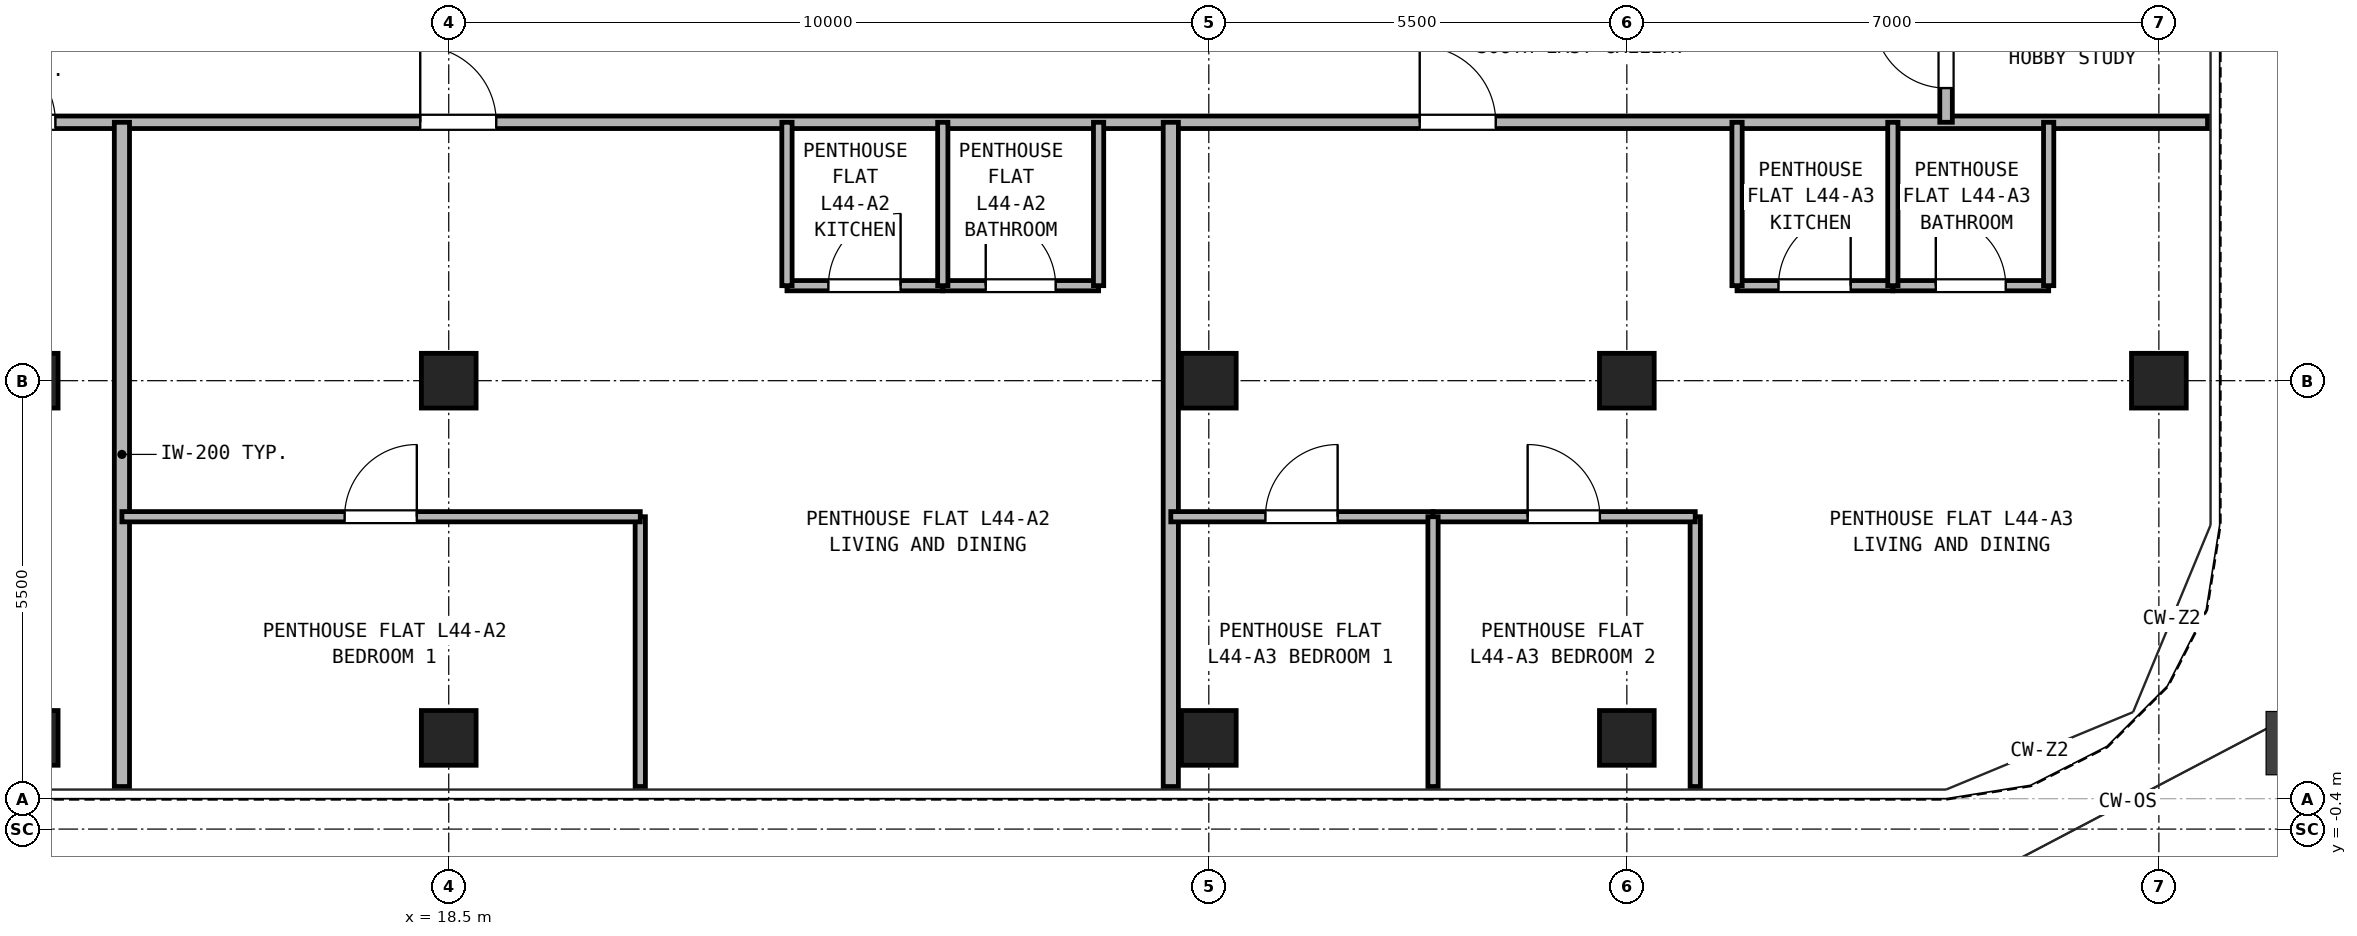
"""IFC4 building model, lengths in metres.
Left out: names, types, materials, properties, quantities, classifications, styles, units other than length and angle.
Written with IfcOpenShell. Run it as: python <this file> out.ifc"""

import sys

from ifc_helpers import new_model, si_unit, direction, frame, frame_2d, origin, origin_2d, place, context, subcontext, project, spatial, rectangle, hollow_rectangle, extrude, source, transform, mapped, element, fill, save


model = new_model("IFC4")
c1 = context("Model", 3, precision=1e-05, world=origin(), true_north=direction((0.0, 1.0)))
c2 = subcontext(c1, "Body", "Model", "MODEL_VIEW")
j1 = project(units=[si_unit("LENGTHUNIT", "METRE"), si_unit("PLANEANGLEUNIT", "RADIAN")], contexts=[c1])
p1 = place(None, origin())
s1 = spatial("IfcSite", under=j1, at=p1, CompositionType="ELEMENT")
p2 = place(p1, origin())
s2 = spatial("IfcBuilding", under=s1, at=p2, CompositionType="ELEMENT")
p3 = place(p2, frame((0.0, 0.0, 159.3)))
s3 = spatial("IfcBuildingStorey", under=s2, at=p3, CompositionType="ELEMENT", Elevation=159.3)
m1 = source(origin(), c2, "Body", "SweptSolid", [
    extrude(hollow_rectangle(XDim=0.72, YDim=0.72, WallThickness=0.04, at=origin_2d()), origin(), (0.0, 0.0, 1.0), 2.95),
])
for number, where, z_axis, x_axis in (
    (1, (13.0, 0.8, 0.0), (0.0, 0.0, 1.0), (1.0, 0.0, 0.0)),
    (2, (18.5, 0.8, 0.0), (0.0, 0.0, 1.0), (1.0, 0.0, 0.0)),
    (3, (28.5, 0.8, 0.0), (0.0, 0.0, 1.0), (1.0, 0.0, 0.0)),
    (4, (34.0, 0.8, 0.0), (0.0, 0.0, 1.0), (1.0, 0.0, 0.0)),
    (5, (41.0, 5.5, 0.0), (0.0, 0.0, 1.0), (1.0, 0.0, 0.0)),
    (6, (13.0, 5.5, 0.0), (0.0, 0.0, 1.0), (1.0, 0.0, 0.0)),
    (7, (18.5, 5.5, 0.0), (0.0, 0.0, 1.0), (1.0, 0.0, 0.0)),
    (8, (28.5, 5.5, 0.0), (0.0, 0.0, 1.0), (1.0, 0.0, 0.0)),
    (9, (34.0, 5.5, 0.0), (0.0, 0.0, 1.0), (1.0, 0.0, 0.0)),
):
    element("IfcColumn", number, at=place(p3, frame(where, z_axis=z_axis, x_axis=x_axis)), inside=s3, PredefinedType="COLUMN", context=c2, shape_type="MappedRepresentation", body=[
        mapped(m1, transform((0.0, 0.0, 0.0), x_axis=(1.0, 0.0, 0.0), y_axis=(0.0, 1.0, 0.0), z_axis=(0.0, 0.0, 1.0), scale=1.0)),
    ])
p4 = place(p3, frame((0.16, 8.9, 0.0), z_axis=(0.0, 0.0, 1.0), x_axis=(1.0, 0.0, 0.0)))
e10 = element("IfcWall", 10, at=p4, inside=s3, PredefinedType="PARTITIONING", context=c2, shape_type="SweptSolid", body=[
    extrude(rectangle(XDim=41.48, YDim=0.165, at=frame_2d((20.74, 0.0))), origin(), (0.0, 0.0, 1.0), 2.95),
])
p5 = place(p4, frame((12.165, 0.0, 0.0)))
e11 = element("IfcOpeningElement", 11, at=p5, cuts=e10, PredefinedType="OPENING", context=c2, shape_type="SweptSolid", body=[
    extrude(rectangle(XDim=1.0, YDim=2.15, at=frame_2d((0.5, 1.075))), frame((0.0, 0.093, 0.0), z_axis=(0.0, -1.0, 0.0), x_axis=(1.0, 0.0, 0.0)), (0.0, 0.0, 1.0), 0.185),
])
p6 = place(p4, frame((17.965, 0.0, 0.0)))
e12 = element("IfcOpeningElement", 12, at=p6, cuts=e10, PredefinedType="OPENING", context=c2, shape_type="SweptSolid", body=[
    extrude(rectangle(XDim=1.0, YDim=2.15, at=frame_2d((0.5, 1.075))), frame((0.0, 0.093, 0.0), z_axis=(0.0, -1.0, 0.0), x_axis=(1.0, 0.0, 0.0)), (0.0, 0.0, 1.0), 0.185),
])
p7 = place(p4, frame((31.115, 0.0, 0.0)))
e13 = element("IfcOpeningElement", 13, at=p7, cuts=e10, PredefinedType="OPENING", context=c2, shape_type="SweptSolid", body=[
    extrude(rectangle(XDim=1.0, YDim=2.15, at=frame_2d((0.5, 1.075))), frame((0.0, 0.093, 0.0), z_axis=(0.0, -1.0, 0.0), x_axis=(1.0, 0.0, 0.0)), (0.0, 0.0, 1.0), 0.185),
])
p8 = place(p3, frame((38.2, 8.9, 0.0), z_axis=(0.0, 0.0, 1.0), x_axis=(0.0, 1.0, 0.0)))
e14 = element("IfcWall", 14, at=p8, inside=s3, PredefinedType="PARTITIONING", context=c2, shape_type="SweptSolid", body=[
    extrude(rectangle(XDim=2.0, YDim=0.165, at=frame_2d((1.0, 0.0))), origin(), (0.0, 0.0, 1.0), 2.95),
])
p9 = place(p8, frame((0.45, 0.0, 0.0)))
e15 = element("IfcOpeningElement", 15, at=p9, cuts=e14, PredefinedType="OPENING", context=c2, shape_type="SweptSolid", body=[
    extrude(rectangle(XDim=0.95, YDim=2.15, at=frame_2d((0.475, 1.075))), frame((0.0, 0.093, 0.0), z_axis=(0.0, -1.0, 0.0), x_axis=(1.0, 0.0, 0.0)), (0.0, 0.0, 1.0), 0.185),
])
p10 = place(p3, frame((14.2, 0.16, 0.0), z_axis=(0.0, 0.0, 1.0), x_axis=(0.0, 1.0, 0.0)))
e16 = element("IfcWall", 16, at=p10, inside=s3, PredefinedType="PARTITIONING", context=c2, shape_type="SweptSolid", body=[
    extrude(rectangle(XDim=8.74, YDim=0.2, at=frame_2d((4.37, 0.0))), origin(), (0.0, 0.0, 1.0), 2.95),
])
p11 = place(p3, frame((22.95, 6.75, 0.0), z_axis=(0.0, 0.0, 1.0), x_axis=(1.0, 0.0, 0.0)))
e17 = element("IfcWall", 17, at=p11, inside=s3, PredefinedType="PARTITIONING", context=c2, shape_type="SweptSolid", body=[
    extrude(rectangle(XDim=2.05, YDim=0.135, at=frame_2d((1.025, 0.0))), origin(), (0.0, 0.0, 1.0), 2.95),
])
p12 = place(p11, frame((0.545, 0.0, 0.0)))
e18 = element("IfcOpeningElement", 18, at=p12, cuts=e17, PredefinedType="OPENING", context=c2, shape_type="SweptSolid", body=[
    extrude(rectangle(XDim=0.95, YDim=2.15, at=frame_2d((0.475, 1.075))), frame((0.0, 0.077, 0.0), z_axis=(0.0, -1.0, 0.0), x_axis=(1.0, 0.0, 0.0)), (0.0, 0.0, 1.0), 0.155),
])
p13 = place(p3, frame((25.0, 6.75, 0.0), z_axis=(0.0, 0.0, 1.0), x_axis=(1.0, 0.0, 0.0)))
e19 = element("IfcWall", 19, at=p13, inside=s3, PredefinedType="PARTITIONING", context=c2, shape_type="SweptSolid", body=[
    extrude(rectangle(XDim=2.05, YDim=0.135, at=frame_2d((1.025, 0.0))), origin(), (0.0, 0.0, 1.0), 2.95),
])
p14 = place(p13, frame((0.565, 0.0, 0.0)))
e20 = element("IfcOpeningElement", 20, at=p14, cuts=e19, PredefinedType="OPENING", context=c2, shape_type="SweptSolid", body=[
    extrude(rectangle(XDim=0.92, YDim=2.1, at=frame_2d((0.46, 1.05))), frame((0.0, 0.077, 0.0), z_axis=(0.0, -1.0, 0.0), x_axis=(1.0, 0.0, 0.0)), (0.0, 0.0, 1.0), 0.155),
])
for number, where, z_axis, x_axis in (
    (21, (22.95, 6.75, 0.0), (0.0, 0.0, 1.0), (0.0, 1.0, 0.0)),
    (22, (25.0, 6.75, 0.0), (0.0, 0.0, 1.0), (0.0, 1.0, 0.0)),
    (23, (27.05, 6.75, 0.0), (0.0, 0.0, 1.0), (0.0, 1.0, 0.0)),
):
    element("IfcWall", number, at=place(p3, frame(where, z_axis=z_axis, x_axis=x_axis)), inside=s3, PredefinedType="PARTITIONING", context=c2, shape_type="SweptSolid", body=[
        extrude(rectangle(XDim=2.15, YDim=0.135, at=frame_2d((1.075, 0.0))), origin(), (0.0, 0.0, 1.0), 2.95),
    ])
p15 = place(p3, frame((21.02, 0.16, 0.0), z_axis=(0.0, 0.0, 1.0), x_axis=(0.0, 1.0, 0.0)))
e24 = element("IfcWall", 24, at=p15, inside=s3, PredefinedType="PARTITIONING", context=c2, shape_type="SweptSolid", body=[
    extrude(rectangle(XDim=3.55, YDim=0.135, at=frame_2d((1.775, 0.0))), origin(), (0.0, 0.0, 1.0), 2.95),
])
p16 = place(p3, frame((14.2, 3.71, 0.0), z_axis=(0.0, 0.0, 1.0), x_axis=(1.0, 0.0, 0.0)))
e25 = element("IfcWall", 25, at=p16, inside=s3, PredefinedType="PARTITIONING", context=c2, shape_type="SweptSolid", body=[
    extrude(rectangle(XDim=6.82, YDim=0.135, at=frame_2d((3.41, 0.0))), origin(), (0.0, 0.0, 1.0), 2.95),
])
p17 = place(p16, frame((2.93, 0.0, 0.0)))
e26 = element("IfcOpeningElement", 26, at=p17, cuts=e25, PredefinedType="OPENING", context=c2, shape_type="SweptSolid", body=[
    extrude(rectangle(XDim=0.95, YDim=2.15, at=frame_2d((0.475, 1.075))), frame((0.0, 0.077, 0.0), z_axis=(0.0, -1.0, 0.0), x_axis=(1.0, 0.0, 0.0)), (0.0, 0.0, 1.0), 0.155),
])
p18 = place(p3, frame((28.0, 0.16, 0.0), z_axis=(0.0, 0.0, 1.0), x_axis=(0.0, 1.0, 0.0)))
e27 = element("IfcWall", 27, at=p18, inside=s3, PredefinedType="PARTITIONING", context=c2, shape_type="SweptSolid", body=[
    extrude(rectangle(XDim=8.74, YDim=0.2, at=frame_2d((4.37, 0.0))), origin(), (0.0, 0.0, 1.0), 2.95),
])
p19 = place(p3, frame((35.45, 6.75, 0.0), z_axis=(0.0, 0.0, 1.0), x_axis=(1.0, 0.0, 0.0)))
e28 = element("IfcWall", 28, at=p19, inside=s3, PredefinedType="PARTITIONING", context=c2, shape_type="SweptSolid", body=[
    extrude(rectangle(XDim=2.05, YDim=0.135, at=frame_2d((1.025, 0.0))), origin(), (0.0, 0.0, 1.0), 2.95),
])
p20 = place(p19, frame((0.545, 0.0, 0.0)))
e29 = element("IfcOpeningElement", 29, at=p20, cuts=e28, PredefinedType="OPENING", context=c2, shape_type="SweptSolid", body=[
    extrude(rectangle(XDim=0.95, YDim=2.15, at=frame_2d((0.475, 1.075))), frame((0.0, 0.077, 0.0), z_axis=(0.0, -1.0, 0.0), x_axis=(1.0, 0.0, 0.0)), (0.0, 0.0, 1.0), 0.155),
])
p21 = place(p3, frame((37.5, 6.75, 0.0), z_axis=(0.0, 0.0, 1.0), x_axis=(1.0, 0.0, 0.0)))
e30 = element("IfcWall", 30, at=p21, inside=s3, PredefinedType="PARTITIONING", context=c2, shape_type="SweptSolid", body=[
    extrude(rectangle(XDim=2.05, YDim=0.135, at=frame_2d((1.025, 0.0))), origin(), (0.0, 0.0, 1.0), 2.95),
])
p22 = place(p21, frame((0.565, 0.0, 0.0)))
e31 = element("IfcOpeningElement", 31, at=p22, cuts=e30, PredefinedType="OPENING", context=c2, shape_type="SweptSolid", body=[
    extrude(rectangle(XDim=0.92, YDim=2.1, at=frame_2d((0.46, 1.05))), frame((0.0, 0.077, 0.0), z_axis=(0.0, -1.0, 0.0), x_axis=(1.0, 0.0, 0.0)), (0.0, 0.0, 1.0), 0.155),
])
for number, where, z_axis, x_axis in (
    (32, (35.45, 6.75, 0.0), (0.0, 0.0, 1.0), (0.0, 1.0, 0.0)),
    (33, (37.5, 6.75, 0.0), (0.0, 0.0, 1.0), (0.0, 1.0, 0.0)),
    (34, (39.55, 6.75, 0.0), (0.0, 0.0, 1.0), (0.0, 1.0, 0.0)),
):
    element("IfcWall", number, at=place(p3, frame(where, z_axis=z_axis, x_axis=x_axis)), inside=s3, PredefinedType="PARTITIONING", context=c2, shape_type="SweptSolid", body=[
        extrude(rectangle(XDim=2.15, YDim=0.135, at=frame_2d((1.075, 0.0))), origin(), (0.0, 0.0, 1.0), 2.95),
    ])
p23 = place(p3, frame((34.9, 0.16, 0.0), z_axis=(0.0, 0.0, 1.0), x_axis=(0.0, 1.0, 0.0)))
e35 = element("IfcWall", 35, at=p23, inside=s3, PredefinedType="PARTITIONING", context=c2, shape_type="SweptSolid", body=[
    extrude(rectangle(XDim=3.55, YDim=0.135, at=frame_2d((1.775, 0.0))), origin(), (0.0, 0.0, 1.0), 2.95),
])
p24 = place(p3, frame((28.0, 3.71, 0.0), z_axis=(0.0, 0.0, 1.0), x_axis=(1.0, 0.0, 0.0)))
e36 = element("IfcWall", 36, at=p24, inside=s3, PredefinedType="PARTITIONING", context=c2, shape_type="SweptSolid", body=[
    extrude(rectangle(XDim=3.45, YDim=0.135, at=frame_2d((1.725, 0.0))), origin(), (0.0, 0.0, 1.0), 2.95),
])
p25 = place(p24, frame((1.245, 0.0, 0.0)))
e37 = element("IfcOpeningElement", 37, at=p25, cuts=e36, PredefinedType="OPENING", context=c2, shape_type="SweptSolid", body=[
    extrude(rectangle(XDim=0.95, YDim=2.15, at=frame_2d((0.475, 1.075))), frame((0.0, 0.077, 0.0), z_axis=(0.0, -1.0, 0.0), x_axis=(1.0, 0.0, 0.0)), (0.0, 0.0, 1.0), 0.155),
])
p26 = place(p3, frame((31.45, 3.71, 0.0), z_axis=(0.0, 0.0, 1.0), x_axis=(1.0, 0.0, 0.0)))
e38 = element("IfcWall", 38, at=p26, inside=s3, PredefinedType="PARTITIONING", context=c2, shape_type="SweptSolid", body=[
    extrude(rectangle(XDim=3.45, YDim=0.135, at=frame_2d((1.725, 0.0))), origin(), (0.0, 0.0, 1.0), 2.95),
])
p27 = place(p26, frame((1.245, 0.0, 0.0)))
e39 = element("IfcOpeningElement", 39, at=p27, cuts=e38, PredefinedType="OPENING", context=c2, shape_type="SweptSolid", body=[
    extrude(rectangle(XDim=0.95, YDim=2.15, at=frame_2d((0.475, 1.075))), frame((0.0, 0.077, 0.0), z_axis=(0.0, -1.0, 0.0), x_axis=(1.0, 0.0, 0.0)), (0.0, 0.0, 1.0), 0.155),
])
p28 = place(p3, frame((31.45, 0.16, 0.0), z_axis=(0.0, 0.0, 1.0), x_axis=(0.0, 1.0, 0.0)))
e40 = element("IfcWall", 40, at=p28, inside=s3, PredefinedType="PARTITIONING", context=c2, shape_type="SweptSolid", body=[
    extrude(rectangle(XDim=3.55, YDim=0.135, at=frame_2d((1.775, 0.0))), origin(), (0.0, 0.0, 1.0), 2.95),
])
p29 = place(p5, frame((1.0, 0.0, 0.0), z_axis=(0.0, 0.0, 1.0), x_axis=(-1.0, 0.0, 0.0)))
e41 = element("IfcDoor", 41, at=p29, inside=s3, OperationType="SINGLE_SWING_LEFT", PredefinedType="DOOR", context=c2, shape_type="SweptSolid", body=[
    extrude(rectangle(XDim=1.0, YDim=2.15, at=frame_2d((0.5, 1.075))), frame((0.0, 0.025, 0.0), z_axis=(0.0, -1.0, 0.0), x_axis=(1.0, 0.0, 0.0)), (0.0, 0.0, 1.0), 0.05),
])
fill(e11, e41)
p30 = place(p12, origin())
e42 = element("IfcDoor", 42, at=p30, inside=s3, OperationType="SINGLE_SWING_RIGHT", PredefinedType="DOOR", context=c2, shape_type="SweptSolid", body=[
    extrude(rectangle(XDim=0.95, YDim=2.15, at=frame_2d((0.475, 1.075))), frame((0.0, 0.025, 0.0), z_axis=(0.0, -1.0, 0.0), x_axis=(1.0, 0.0, 0.0)), (0.0, 0.0, 1.0), 0.05),
])
fill(e18, e42)
p31 = place(p14, origin())
e43 = element("IfcDoor", 43, at=p31, inside=s3, OperationType="SINGLE_SWING_LEFT", PredefinedType="DOOR", context=c2, shape_type="SweptSolid", body=[
    extrude(rectangle(XDim=0.92, YDim=2.1, at=frame_2d((0.46, 1.05))), frame((0.0, 0.025, 0.0), z_axis=(0.0, -1.0, 0.0), x_axis=(1.0, 0.0, 0.0)), (0.0, 0.0, 1.0), 0.05),
])
fill(e20, e43)
p32 = place(p17, frame((0.95, 0.0, 0.0), z_axis=(0.0, 0.0, 1.0), x_axis=(-1.0, 0.0, 0.0)))
e44 = element("IfcDoor", 44, at=p32, inside=s3, OperationType="SINGLE_SWING_RIGHT", PredefinedType="DOOR", context=c2, shape_type="SweptSolid", body=[
    extrude(rectangle(XDim=0.95, YDim=2.15, at=frame_2d((0.475, 1.075))), frame((0.0, 0.025, 0.0), z_axis=(0.0, -1.0, 0.0), x_axis=(1.0, 0.0, 0.0)), (0.0, 0.0, 1.0), 0.05),
])
fill(e26, e44)
p33 = place(p6, frame((1.0, 0.0, 0.0), z_axis=(0.0, 0.0, 1.0), x_axis=(-1.0, 0.0, 0.0)))
e45 = element("IfcDoor", 45, at=p33, inside=s3, OperationType="SINGLE_SWING_LEFT", PredefinedType="DOOR", context=c2, shape_type="SweptSolid", body=[
    extrude(rectangle(XDim=1.0, YDim=2.15, at=frame_2d((0.5, 1.075))), frame((0.0, 0.025, 0.0), z_axis=(0.0, -1.0, 0.0), x_axis=(1.0, 0.0, 0.0)), (0.0, 0.0, 1.0), 0.05),
])
fill(e12, e45)
p34 = place(p20, origin())
e46 = element("IfcDoor", 46, at=p34, inside=s3, OperationType="SINGLE_SWING_RIGHT", PredefinedType="DOOR", context=c2, shape_type="SweptSolid", body=[
    extrude(rectangle(XDim=0.95, YDim=2.15, at=frame_2d((0.475, 1.075))), frame((0.0, 0.025, 0.0), z_axis=(0.0, -1.0, 0.0), x_axis=(1.0, 0.0, 0.0)), (0.0, 0.0, 1.0), 0.05),
])
fill(e29, e46)
p35 = place(p22, origin())
e47 = element("IfcDoor", 47, at=p35, inside=s3, OperationType="SINGLE_SWING_LEFT", PredefinedType="DOOR", context=c2, shape_type="SweptSolid", body=[
    extrude(rectangle(XDim=0.92, YDim=2.1, at=frame_2d((0.46, 1.05))), frame((0.0, 0.025, 0.0), z_axis=(0.0, -1.0, 0.0), x_axis=(1.0, 0.0, 0.0)), (0.0, 0.0, 1.0), 0.05),
])
fill(e31, e47)
p36 = place(p25, frame((0.95, 0.0, 0.0), z_axis=(0.0, 0.0, 1.0), x_axis=(-1.0, 0.0, 0.0)))
e48 = element("IfcDoor", 48, at=p36, inside=s3, OperationType="SINGLE_SWING_RIGHT", PredefinedType="DOOR", context=c2, shape_type="SweptSolid", body=[
    extrude(rectangle(XDim=0.95, YDim=2.15, at=frame_2d((0.475, 1.075))), frame((0.0, 0.025, 0.0), z_axis=(0.0, -1.0, 0.0), x_axis=(1.0, 0.0, 0.0)), (0.0, 0.0, 1.0), 0.05),
])
fill(e37, e48)
p37 = place(p27, frame((0.95, 0.0, 0.0), z_axis=(0.0, 0.0, 1.0), x_axis=(-1.0, 0.0, 0.0)))
e49 = element("IfcDoor", 49, at=p37, inside=s3, OperationType="SINGLE_SWING_LEFT", PredefinedType="DOOR", context=c2, shape_type="SweptSolid", body=[
    extrude(rectangle(XDim=0.95, YDim=2.15, at=frame_2d((0.475, 1.075))), frame((0.0, 0.025, 0.0), z_axis=(0.0, -1.0, 0.0), x_axis=(1.0, 0.0, 0.0)), (0.0, 0.0, 1.0), 0.05),
])
fill(e39, e49)
p38 = place(p7, frame((1.0, 0.0, 0.0), z_axis=(0.0, 0.0, 1.0), x_axis=(-1.0, 0.0, 0.0)))
e50 = element("IfcDoor", 50, at=p38, inside=s3, OperationType="SINGLE_SWING_LEFT", PredefinedType="DOOR", context=c2, shape_type="SweptSolid", body=[
    extrude(rectangle(XDim=1.0, YDim=2.15, at=frame_2d((0.5, 1.075))), frame((0.0, 0.025, 0.0), z_axis=(0.0, -1.0, 0.0), x_axis=(1.0, 0.0, 0.0)), (0.0, 0.0, 1.0), 0.05),
])
fill(e13, e50)
p39 = place(p9, origin())
e51 = element("IfcDoor", 51, at=p39, inside=s3, OperationType="SINGLE_SWING_RIGHT", PredefinedType="DOOR", context=c2, shape_type="SweptSolid", body=[
    extrude(rectangle(XDim=0.95, YDim=2.15, at=frame_2d((0.475, 1.075))), frame((0.0, 0.025, 0.0), z_axis=(0.0, -1.0, 0.0), x_axis=(1.0, 0.0, 0.0)), (0.0, 0.0, 1.0), 0.05),
])
fill(e15, e51)
save(model, sys.argv[1])
